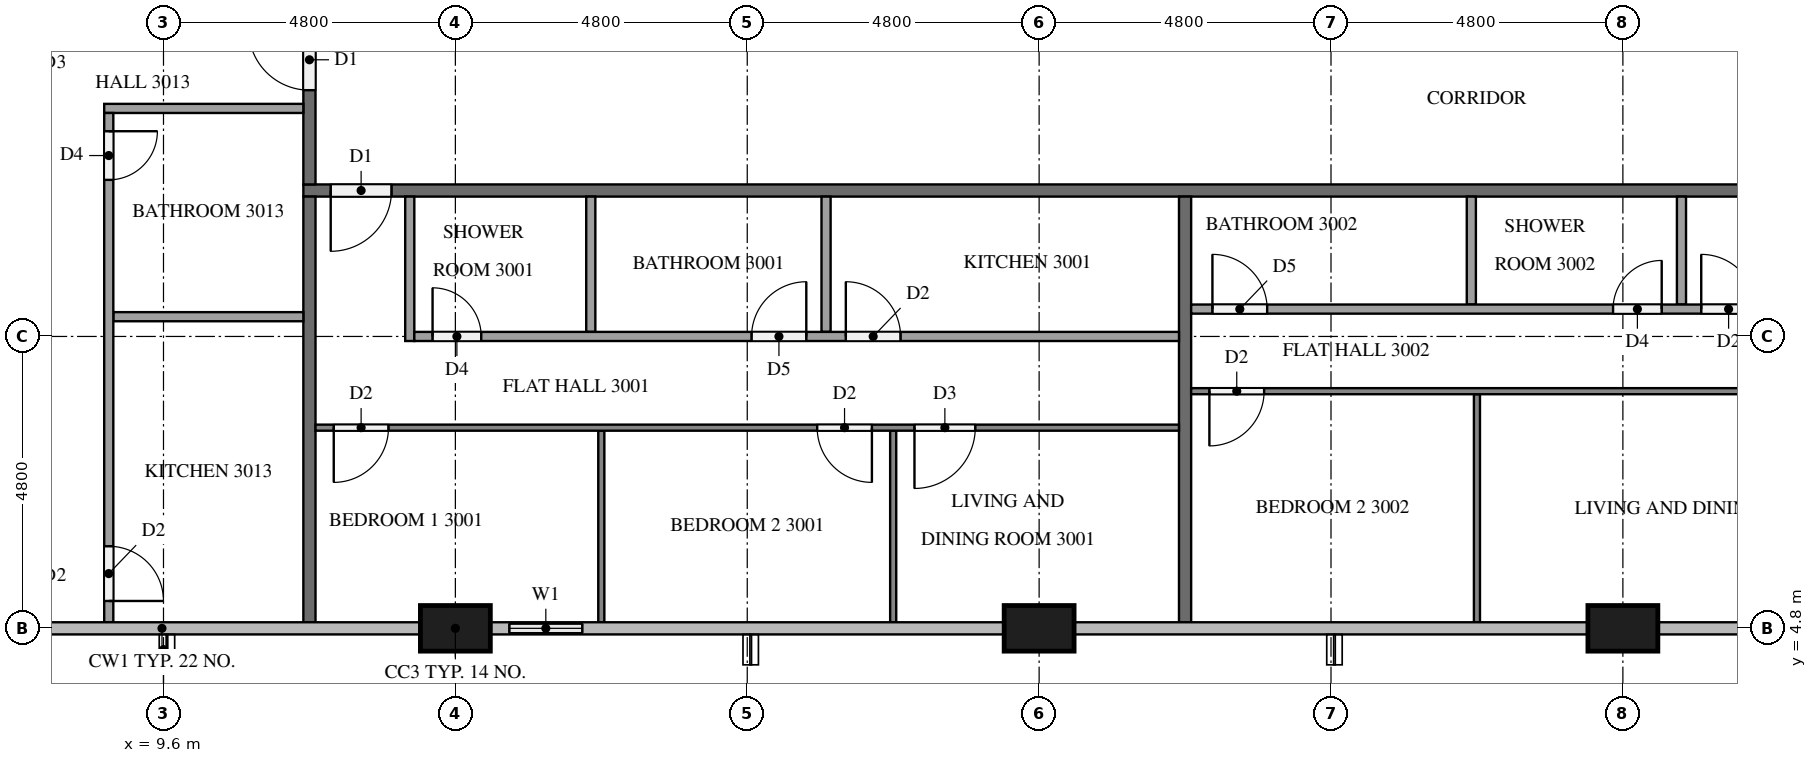
"""IFC4 building model, lengths in metres.
Left out: names, types, materials, properties, quantities, classifications, styles, units other than length and angle.
Written with IfcOpenShell. Run it as: python <this file> out.ifc"""

import sys

from ifc_helpers import new_model, si_unit, direction, frame, frame_2d, origin, origin_2d, place, context, subcontext, project, spatial, rectangle, extrude, element, fill, save


model = new_model("IFC4")
c1 = context("Model", 3, precision=1e-05, world=origin(), true_north=direction((0.0, 1.0)))
c2 = subcontext(c1, "Body", "Model", "MODEL_VIEW")
j1 = project(units=[si_unit("LENGTHUNIT", "METRE"), si_unit("PLANEANGLEUNIT", "RADIAN")], contexts=[c1])
p1 = place(None, origin())
s1 = spatial("IfcSite", under=j1, at=p1, CompositionType="ELEMENT")
p2 = place(p1, origin())
s2 = spatial("IfcBuilding", under=s1, at=p2, CompositionType="ELEMENT")
p3 = place(p2, frame((0.0, 0.0, 119.1)))
s3 = spatial("IfcBuildingStorey", under=s2, at=p3, CompositionType="ELEMENT", Elevation=119.1)
for number, where, z_axis, x_axis in (
    (1, (14.4, 4.8, 0.0), (0.0, 0.0, 1.0), (1.0, 0.0, 0.0)),
    (2, (24.0, 4.8, 0.0), (0.0, 0.0, 1.0), (1.0, 0.0, 0.0)),
    (3, (33.6, 4.8, 0.0), (0.0, 0.0, 1.0), (1.0, 0.0, 0.0)),
):
    element("IfcColumn", number, at=place(p3, frame(where, z_axis=z_axis, x_axis=x_axis)), inside=s3, PredefinedType="COLUMN", context=c2, shape_type="SweptSolid", body=[
        extrude(rectangle(XDim=1.15, YDim=0.75, at=origin_2d()), origin(), (0.0, 0.0, 1.0), 3.2),
    ])
p4 = place(p3, frame((14.975, 4.8, 0.0), z_axis=(0.0, 0.0, 1.0), x_axis=(1.0, 0.0, 0.0)))
e4 = element("IfcWall", 4, at=p4, inside=s3, PredefinedType="SOLIDWALL", context=c2, shape_type="SweptSolid", body=[
    extrude(rectangle(XDim=1.825, YDim=0.15, at=frame_2d((0.913, 0.0))), origin(), (0.0, 0.0, 1.0), 3.2),
])
p5 = place(p4, frame((0.312, 0.0, 0.9)))
e5 = element("IfcOpeningElement", 5, at=p5, cuts=e4, PredefinedType="OPENING", context=c2, shape_type="SweptSolid", body=[
    extrude(rectangle(XDim=1.2, YDim=1.4, at=frame_2d((0.6, 0.7))), frame((0.0, 0.085, 0.0), z_axis=(0.0, -1.0, 0.0), x_axis=(1.0, 0.0, 0.0)), (0.0, 0.0, 1.0), 0.17),
])
p6 = place(p3, frame((50.5, 12.0, 0.0), z_axis=(0.0, 0.0, 1.0), x_axis=(-1.0, 0.0, 0.0)))
e6 = element("IfcWall", 6, at=p6, inside=s3, PredefinedType="PARTITIONING", context=c2, shape_type="SweptSolid", body=[
    extrude(rectangle(XDim=38.6, YDim=0.2, at=frame_2d((19.3, 0.0))), origin(), (0.0, 0.0, 1.0), 3.2),
])
p7 = place(p6, frame((37.15, 0.0, 0.0)))
e7 = element("IfcOpeningElement", 7, at=p7, cuts=e6, PredefinedType="OPENING", context=c2, shape_type="SweptSolid", body=[
    extrude(rectangle(XDim=1.0, YDim=2.1, at=frame_2d((0.5, 1.05))), frame((0.0, 0.11, 0.0), z_axis=(0.0, -1.0, 0.0), x_axis=(1.0, 0.0, 0.0)), (0.0, 0.0, 1.0), 0.22),
])
p8 = place(p6, frame((7.65, 0.0, 0.0)))
e8 = element("IfcOpeningElement", 8, at=p8, cuts=e6, PredefinedType="OPENING", context=c2, shape_type="SweptSolid", body=[
    extrude(rectangle(XDim=1.0, YDim=2.1, at=frame_2d((0.5, 1.05))), frame((0.0, 0.11, 0.0), z_axis=(0.0, -1.0, 0.0), x_axis=(1.0, 0.0, 0.0)), (0.0, 0.0, 1.0), 0.22),
])
p9 = place(p6, frame((5.95, 0.0, 0.0)))
e9 = element("IfcOpeningElement", 9, at=p9, cuts=e6, PredefinedType="OPENING", context=c2, shape_type="SweptSolid", body=[
    extrude(rectangle(XDim=1.0, YDim=2.1, at=frame_2d((0.5, 1.05))), frame((0.0, 0.11, 0.0), z_axis=(0.0, -1.0, 0.0), x_axis=(1.0, 0.0, 0.0)), (0.0, 0.0, 1.0), 0.22),
])
p10 = place(p3, frame((12.0, 12.1, 0.0), z_axis=(0.0, 0.0, 1.0), x_axis=(0.0, 1.0, 0.0)))
e10 = element("IfcWall", 10, at=p10, inside=s3, PredefinedType="PARTITIONING", context=c2, shape_type="SweptSolid", body=[
    extrude(rectangle(XDim=2.8, YDim=0.2, at=frame_2d((1.4, 0.0))), origin(), (0.0, 0.0, 1.0), 3.2),
])
p11 = place(p10, frame((1.55, 0.0, 0.0)))
e11 = element("IfcOpeningElement", 11, at=p11, cuts=e10, PredefinedType="OPENING", context=c2, shape_type="SweptSolid", body=[
    extrude(rectangle(XDim=1.0, YDim=2.1, at=frame_2d((0.5, 1.05))), frame((0.0, 0.11, 0.0), z_axis=(0.0, -1.0, 0.0), x_axis=(1.0, 0.0, 0.0)), (0.0, 0.0, 1.0), 0.22),
])
for number, where, z_axis, x_axis in (
    (12, (26.4, 11.9, 0.0), (0.0, 0.0, 1.0), (0.0, -1.0, 0.0)),
    (13, (12.0, 4.9, 0.0), (0.0, 0.0, 1.0), (0.0, 1.0, 0.0)),
):
    element("IfcWall", number, at=place(p3, frame(where, z_axis=z_axis, x_axis=x_axis)), inside=s3, PredefinedType="PARTITIONING", context=c2, shape_type="SweptSolid", body=[
        extrude(rectangle(XDim=7.0, YDim=0.2, at=frame_2d((3.5, 0.0))), origin(), (0.0, 0.0, 1.0), 3.2),
    ])
for number, where, z_axis, x_axis in (
    (14, (16.8, 8.05, 0.0), (0.0, 0.0, 1.0), (0.0, -1.0, 0.0)),
    (15, (21.6, 8.05, 0.0), (0.0, 0.0, 1.0), (0.0, -1.0, 0.0)),
):
    element("IfcWall", number, at=place(p3, frame(where, z_axis=z_axis, x_axis=x_axis)), inside=s3, PredefinedType="PARTITIONING", context=c2, shape_type="SweptSolid", body=[
        extrude(rectangle(XDim=3.15, YDim=0.1, at=frame_2d((1.575, 0.0))), origin(), (0.0, 0.0, 1.0), 3.2),
    ])
p12 = place(p3, frame((26.3, 8.1, 0.0), z_axis=(0.0, 0.0, 1.0), x_axis=(-1.0, 0.0, 0.0)))
e16 = element("IfcWall", 16, at=p12, inside=s3, PredefinedType="PARTITIONING", context=c2, shape_type="SweptSolid", body=[
    extrude(rectangle(XDim=14.2, YDim=0.1, at=frame_2d((7.1, 0.0))), origin(), (0.0, 0.0, 1.0), 3.2),
])
p13 = place(p12, frame((13.0, 0.0, 0.0)))
e17 = element("IfcOpeningElement", 17, at=p13, cuts=e16, PredefinedType="OPENING", context=c2, shape_type="SweptSolid", body=[
    extrude(rectangle(XDim=0.9, YDim=2.1, at=frame_2d((0.45, 1.05))), frame((0.0, 0.06, 0.0), z_axis=(0.0, -1.0, 0.0), x_axis=(1.0, 0.0, 0.0)), (0.0, 0.0, 1.0), 0.12),
])
p14 = place(p12, frame((5.05, 0.0, 0.0)))
e18 = element("IfcOpeningElement", 18, at=p14, cuts=e16, PredefinedType="OPENING", context=c2, shape_type="SweptSolid", body=[
    extrude(rectangle(XDim=0.9, YDim=2.1, at=frame_2d((0.45, 1.05))), frame((0.0, 0.06, 0.0), z_axis=(0.0, -1.0, 0.0), x_axis=(1.0, 0.0, 0.0)), (0.0, 0.0, 1.0), 0.12),
])
p15 = place(p12, frame((3.35, 0.0, 0.0)))
e19 = element("IfcOpeningElement", 19, at=p15, cuts=e16, PredefinedType="OPENING", context=c2, shape_type="SweptSolid", body=[
    extrude(rectangle(XDim=1.0, YDim=2.1, at=frame_2d((0.5, 1.05))), frame((0.0, 0.06, 0.0), z_axis=(0.0, -1.0, 0.0), x_axis=(1.0, 0.0, 0.0)), (0.0, 0.0, 1.0), 0.12),
])
for number, where, z_axis, x_axis in (
    (20, (16.627, 11.9, 0.0), (0.0, 0.0, 1.0), (0.0, -1.0, 0.0)),
    (21, (20.496, 11.9, 0.0), (0.0, 0.0, 1.0), (0.0, -1.0, 0.0)),
):
    element("IfcWall", number, at=place(p3, frame(where, z_axis=z_axis, x_axis=x_axis)), inside=s3, PredefinedType="PARTITIONING", context=c2, shape_type="SweptSolid", body=[
        extrude(rectangle(XDim=2.225, YDim=0.15, at=frame_2d((1.112, 0.0))), origin(), (0.0, 0.0, 1.0), 3.2),
    ])
p16 = place(p3, frame((13.65, 11.9, 0.0), z_axis=(0.0, 0.0, 1.0), x_axis=(0.0, -1.0, 0.0)))
e22 = element("IfcWall", 22, at=p16, inside=s3, PredefinedType="PARTITIONING", context=c2, shape_type="SweptSolid", body=[
    extrude(rectangle(XDim=2.375, YDim=0.15, at=frame_2d((1.188, 0.0))), origin(), (0.0, 0.0, 1.0), 3.2),
])
p17 = place(p3, frame((13.725, 9.6, 0.0), z_axis=(0.0, 0.0, 1.0), x_axis=(1.0, 0.0, 0.0)))
e23 = element("IfcWall", 23, at=p17, inside=s3, PredefinedType="PARTITIONING", context=c2, shape_type="SweptSolid", body=[
    extrude(rectangle(XDim=12.575, YDim=0.15, at=frame_2d((6.288, 0.0))), origin(), (0.0, 0.0, 1.0), 3.2),
])
p18 = place(p17, frame((0.3, 0.0, 0.0)))
e24 = element("IfcOpeningElement", 24, at=p18, cuts=e23, PredefinedType="OPENING", context=c2, shape_type="SweptSolid", body=[
    extrude(rectangle(XDim=0.8, YDim=2.1, at=frame_2d((0.4, 1.05))), frame((0.0, 0.085, 0.0), z_axis=(0.0, -1.0, 0.0), x_axis=(1.0, 0.0, 0.0)), (0.0, 0.0, 1.0), 0.17),
])
p19 = place(p17, frame((5.546, 0.0, 0.0)))
e25 = element("IfcOpeningElement", 25, at=p19, cuts=e23, PredefinedType="OPENING", context=c2, shape_type="SweptSolid", body=[
    extrude(rectangle(XDim=0.9, YDim=2.1, at=frame_2d((0.45, 1.05))), frame((0.0, 0.085, 0.0), z_axis=(0.0, -1.0, 0.0), x_axis=(1.0, 0.0, 0.0)), (0.0, 0.0, 1.0), 0.17),
])
p20 = place(p17, frame((7.096, 0.0, 0.0)))
e26 = element("IfcOpeningElement", 26, at=p20, cuts=e23, PredefinedType="OPENING", context=c2, shape_type="SweptSolid", body=[
    extrude(rectangle(XDim=0.9, YDim=2.1, at=frame_2d((0.45, 1.05))), frame((0.0, 0.085, 0.0), z_axis=(0.0, -1.0, 0.0), x_axis=(1.0, 0.0, 0.0)), (0.0, 0.0, 1.0), 0.17),
])
p21 = place(p3, frame((31.2, 8.65, 0.0), z_axis=(0.0, 0.0, 1.0), x_axis=(0.0, -1.0, 0.0)))
e27 = element("IfcWall", 27, at=p21, inside=s3, PredefinedType="PARTITIONING", context=c2, shape_type="SweptSolid", body=[
    extrude(rectangle(XDim=3.75, YDim=0.1, at=frame_2d((1.875, 0.0))), origin(), (0.0, 0.0, 1.0), 3.2),
])
p22 = place(p3, frame((43.1, 8.7, 0.0), z_axis=(0.0, 0.0, 1.0), x_axis=(-1.0, 0.0, 0.0)))
e28 = element("IfcWall", 28, at=p22, inside=s3, PredefinedType="PARTITIONING", context=c2, shape_type="SweptSolid", body=[
    extrude(rectangle(XDim=16.6, YDim=0.1, at=frame_2d((8.3, 0.0))), origin(), (0.0, 0.0, 1.0), 3.2),
])
p23 = place(p22, frame((3.45, 0.0, 0.0)))
e29 = element("IfcOpeningElement", 29, at=p23, cuts=e28, PredefinedType="OPENING", context=c2, shape_type="SweptSolid", body=[
    extrude(rectangle(XDim=0.9, YDim=2.1, at=frame_2d((0.45, 1.05))), frame((0.0, 0.06, 0.0), z_axis=(0.0, -1.0, 0.0), x_axis=(1.0, 0.0, 0.0)), (0.0, 0.0, 1.0), 0.12),
])
p24 = place(p22, frame((5.05, 0.0, 0.0)))
e30 = element("IfcOpeningElement", 30, at=p24, cuts=e28, PredefinedType="OPENING", context=c2, shape_type="SweptSolid", body=[
    extrude(rectangle(XDim=1.0, YDim=2.1, at=frame_2d((0.5, 1.05))), frame((0.0, 0.06, 0.0), z_axis=(0.0, -1.0, 0.0), x_axis=(1.0, 0.0, 0.0)), (0.0, 0.0, 1.0), 0.12),
])
p25 = place(p22, frame((15.4, 0.0, 0.0)))
e31 = element("IfcOpeningElement", 31, at=p25, cuts=e28, PredefinedType="OPENING", context=c2, shape_type="SweptSolid", body=[
    extrude(rectangle(XDim=0.9, YDim=2.1, at=frame_2d((0.45, 1.05))), frame((0.0, 0.06, 0.0), z_axis=(0.0, -1.0, 0.0), x_axis=(1.0, 0.0, 0.0)), (0.0, 0.0, 1.0), 0.12),
])
for number, where, z_axis, x_axis in (
    (32, (34.563, 11.9, 0.0), (0.0, 0.0, 1.0), (0.0, -1.0, 0.0)),
    (33, (31.108, 11.9, 0.0), (0.0, 0.0, 1.0), (0.0, -1.0, 0.0)),
):
    element("IfcWall", number, at=place(p3, frame(where, z_axis=z_axis, x_axis=x_axis)), inside=s3, PredefinedType="PARTITIONING", context=c2, shape_type="SweptSolid", body=[
        extrude(rectangle(XDim=1.775, YDim=0.15, at=frame_2d((0.887, 0.0))), origin(), (0.0, 0.0, 1.0), 3.2),
    ])
p26 = place(p3, frame((26.5, 10.05, 0.0), z_axis=(0.0, 0.0, 1.0), x_axis=(1.0, 0.0, 0.0)))
e34 = element("IfcWall", 34, at=p26, inside=s3, PredefinedType="PARTITIONING", context=c2, shape_type="SweptSolid", body=[
    extrude(rectangle(XDim=14.975, YDim=0.15, at=frame_2d((7.488, 0.0))), origin(), (0.0, 0.0, 1.0), 3.2),
])
p27 = place(p26, frame((8.388, 0.0, 0.0)))
e35 = element("IfcOpeningElement", 35, at=p27, cuts=e34, PredefinedType="OPENING", context=c2, shape_type="SweptSolid", body=[
    extrude(rectangle(XDim=0.9, YDim=2.1, at=frame_2d((0.45, 1.05))), frame((0.0, 0.085, 0.0), z_axis=(0.0, -1.0, 0.0), x_axis=(1.0, 0.0, 0.0)), (0.0, 0.0, 1.0), 0.17),
])
p28 = place(p26, frame((6.938, 0.0, 0.0)))
e36 = element("IfcOpeningElement", 36, at=p28, cuts=e34, PredefinedType="OPENING", context=c2, shape_type="SweptSolid", body=[
    extrude(rectangle(XDim=0.8, YDim=2.1, at=frame_2d((0.4, 1.05))), frame((0.0, 0.085, 0.0), z_axis=(0.0, -1.0, 0.0), x_axis=(1.0, 0.0, 0.0)), (0.0, 0.0, 1.0), 0.17),
])
p29 = place(p26, frame((0.35, 0.0, 0.0)))
e37 = element("IfcOpeningElement", 37, at=p29, cuts=e34, PredefinedType="OPENING", context=c2, shape_type="SweptSolid", body=[
    extrude(rectangle(XDim=0.9, YDim=2.1, at=frame_2d((0.45, 1.05))), frame((0.0, 0.085, 0.0), z_axis=(0.0, -1.0, 0.0), x_axis=(1.0, 0.0, 0.0)), (0.0, 0.0, 1.0), 0.17),
])
p30 = place(p3, frame((11.9, 9.925, 0.0), z_axis=(0.0, 0.0, 1.0), x_axis=(-1.0, 0.0, 0.0)))
e38 = element("IfcWall", 38, at=p30, inside=s3, PredefinedType="PARTITIONING", context=c2, shape_type="SweptSolid", body=[
    extrude(rectangle(XDim=3.125, YDim=0.15, at=frame_2d((1.562, 0.0))), origin(), (0.0, 0.0, 1.0), 3.2),
])
p31 = place(p3, frame((11.9, 13.35, 0.0), z_axis=(0.0, 0.0, 1.0), x_axis=(-1.0, 0.0, 0.0)))
e39 = element("IfcWall", 39, at=p31, inside=s3, PredefinedType="PARTITIONING", context=c2, shape_type="SweptSolid", body=[
    extrude(rectangle(XDim=3.275, YDim=0.15, at=frame_2d((1.637, 0.0))), origin(), (0.0, 0.0, 1.0), 3.2),
])
p32 = place(p3, frame((8.7, 13.275, 0.0), z_axis=(0.0, 0.0, 1.0), x_axis=(0.0, -1.0, 0.0)))
e40 = element("IfcWall", 40, at=p32, inside=s3, PredefinedType="PARTITIONING", context=c2, shape_type="SweptSolid", body=[
    extrude(rectangle(XDim=8.375, YDim=0.15, at=frame_2d((4.188, 0.0))), origin(), (0.0, 0.0, 1.0), 3.2),
])
p33 = place(p32, frame((0.3, 0.0, 0.0)))
e41 = element("IfcOpeningElement", 41, at=p33, cuts=e40, PredefinedType="OPENING", context=c2, shape_type="SweptSolid", body=[
    extrude(rectangle(XDim=0.8, YDim=2.1, at=frame_2d((0.4, 1.05))), frame((0.0, 0.085, 0.0), z_axis=(0.0, -1.0, 0.0), x_axis=(1.0, 0.0, 0.0)), (0.0, 0.0, 1.0), 0.17),
])
p34 = place(p32, frame((7.125, 0.0, 0.0)))
e42 = element("IfcOpeningElement", 42, at=p34, cuts=e40, PredefinedType="OPENING", context=c2, shape_type="SweptSolid", body=[
    extrude(rectangle(XDim=0.9, YDim=2.1, at=frame_2d((0.45, 1.05))), frame((0.0, 0.085, 0.0), z_axis=(0.0, -1.0, 0.0), x_axis=(1.0, 0.0, 0.0)), (0.0, 0.0, 1.0), 0.17),
])
p35 = place(p5, origin())
e43 = element("IfcWindow", 43, at=p35, inside=s3, PartitioningType="SINGLE_PANEL", PredefinedType="WINDOW", context=c2, shape_type="SweptSolid", body=[
    extrude(rectangle(XDim=1.2, YDim=1.4, at=frame_2d((0.6, 0.7))), frame((0.0, 0.03, 0.0), z_axis=(0.0, -1.0, 0.0), x_axis=(1.0, 0.0, 0.0)), (0.0, 0.0, 1.0), 0.06),
])
fill(e5, e43)
p36 = place(p7, origin())
e44 = element("IfcDoor", 44, at=p36, inside=s3, OperationType="SINGLE_SWING_RIGHT", PredefinedType="DOOR", context=c2, shape_type="SweptSolid", body=[
    extrude(rectangle(XDim=1.0, YDim=2.1, at=frame_2d((0.5, 1.05))), frame((0.0, 0.025, 0.0), z_axis=(0.0, -1.0, 0.0), x_axis=(1.0, 0.0, 0.0)), (0.0, 0.0, 1.0), 0.05),
])
fill(e7, e44)
p37 = place(p11, origin())
e45 = element("IfcDoor", 45, at=p37, inside=s3, OperationType="SINGLE_SWING_RIGHT", PredefinedType="DOOR", context=c2, shape_type="SweptSolid", body=[
    extrude(rectangle(XDim=1.0, YDim=2.1, at=frame_2d((0.5, 1.05))), frame((0.0, 0.025, 0.0), z_axis=(0.0, -1.0, 0.0), x_axis=(1.0, 0.0, 0.0)), (0.0, 0.0, 1.0), 0.05),
])
fill(e11, e45)
p38 = place(p13, origin())
e46 = element("IfcDoor", 46, at=p38, inside=s3, OperationType="SINGLE_SWING_RIGHT", PredefinedType="DOOR", context=c2, shape_type="SweptSolid", body=[
    extrude(rectangle(XDim=0.9, YDim=2.1, at=frame_2d((0.45, 1.05))), frame((0.0, 0.025, 0.0), z_axis=(0.0, -1.0, 0.0), x_axis=(1.0, 0.0, 0.0)), (0.0, 0.0, 1.0), 0.05),
])
fill(e17, e46)
p39 = place(p14, origin())
e47 = element("IfcDoor", 47, at=p39, inside=s3, OperationType="SINGLE_SWING_LEFT", PredefinedType="DOOR", context=c2, shape_type="SweptSolid", body=[
    extrude(rectangle(XDim=0.9, YDim=2.1, at=frame_2d((0.45, 1.05))), frame((0.0, 0.025, 0.0), z_axis=(0.0, -1.0, 0.0), x_axis=(1.0, 0.0, 0.0)), (0.0, 0.0, 1.0), 0.05),
])
fill(e18, e47)
p40 = place(p15, origin())
e48 = element("IfcDoor", 48, at=p40, inside=s3, OperationType="SINGLE_SWING_RIGHT", PredefinedType="DOOR", context=c2, shape_type="SweptSolid", body=[
    extrude(rectangle(XDim=1.0, YDim=2.1, at=frame_2d((0.5, 1.05))), frame((0.0, 0.025, 0.0), z_axis=(0.0, -1.0, 0.0), x_axis=(1.0, 0.0, 0.0)), (0.0, 0.0, 1.0), 0.05),
])
fill(e19, e48)
p41 = place(p18, origin())
e49 = element("IfcDoor", 49, at=p41, inside=s3, OperationType="SINGLE_SWING_LEFT", PredefinedType="DOOR", context=c2, shape_type="SweptSolid", body=[
    extrude(rectangle(XDim=0.8, YDim=2.1, at=frame_2d((0.4, 1.05))), frame((0.0, 0.025, 0.0), z_axis=(0.0, -1.0, 0.0), x_axis=(1.0, 0.0, 0.0)), (0.0, 0.0, 1.0), 0.05),
])
fill(e24, e49)
p42 = place(p19, origin())
e50 = element("IfcDoor", 50, at=p42, inside=s3, OperationType="SINGLE_SWING_RIGHT", PredefinedType="DOOR", context=c2, shape_type="SweptSolid", body=[
    extrude(rectangle(XDim=0.9, YDim=2.1, at=frame_2d((0.45, 1.05))), frame((0.0, 0.025, 0.0), z_axis=(0.0, -1.0, 0.0), x_axis=(1.0, 0.0, 0.0)), (0.0, 0.0, 1.0), 0.05),
])
fill(e25, e50)
p43 = place(p20, origin())
e51 = element("IfcDoor", 51, at=p43, inside=s3, OperationType="SINGLE_SWING_LEFT", PredefinedType="DOOR", context=c2, shape_type="SweptSolid", body=[
    extrude(rectangle(XDim=0.9, YDim=2.1, at=frame_2d((0.45, 1.05))), frame((0.0, 0.025, 0.0), z_axis=(0.0, -1.0, 0.0), x_axis=(1.0, 0.0, 0.0)), (0.0, 0.0, 1.0), 0.05),
])
fill(e26, e51)
p44 = place(p25, origin())
e52 = element("IfcDoor", 52, at=p44, inside=s3, OperationType="SINGLE_SWING_RIGHT", PredefinedType="DOOR", context=c2, shape_type="SweptSolid", body=[
    extrude(rectangle(XDim=0.9, YDim=2.1, at=frame_2d((0.45, 1.05))), frame((0.0, 0.025, 0.0), z_axis=(0.0, -1.0, 0.0), x_axis=(1.0, 0.0, 0.0)), (0.0, 0.0, 1.0), 0.05),
])
fill(e31, e52)
p45 = place(p27, origin())
e53 = element("IfcDoor", 53, at=p45, inside=s3, OperationType="SINGLE_SWING_LEFT", PredefinedType="DOOR", context=c2, shape_type="SweptSolid", body=[
    extrude(rectangle(XDim=0.9, YDim=2.1, at=frame_2d((0.45, 1.05))), frame((0.0, 0.025, 0.0), z_axis=(0.0, -1.0, 0.0), x_axis=(1.0, 0.0, 0.0)), (0.0, 0.0, 1.0), 0.05),
])
fill(e35, e53)
p46 = place(p28, origin())
e54 = element("IfcDoor", 54, at=p46, inside=s3, OperationType="SINGLE_SWING_RIGHT", PredefinedType="DOOR", context=c2, shape_type="SweptSolid", body=[
    extrude(rectangle(XDim=0.8, YDim=2.1, at=frame_2d((0.4, 1.05))), frame((0.0, 0.025, 0.0), z_axis=(0.0, -1.0, 0.0), x_axis=(1.0, 0.0, 0.0)), (0.0, 0.0, 1.0), 0.05),
])
fill(e36, e54)
p47 = place(p29, origin())
e55 = element("IfcDoor", 55, at=p47, inside=s3, OperationType="SINGLE_SWING_LEFT", PredefinedType="DOOR", context=c2, shape_type="SweptSolid", body=[
    extrude(rectangle(XDim=0.9, YDim=2.1, at=frame_2d((0.45, 1.05))), frame((0.0, 0.025, 0.0), z_axis=(0.0, -1.0, 0.0), x_axis=(1.0, 0.0, 0.0)), (0.0, 0.0, 1.0), 0.05),
])
fill(e37, e55)
p48 = place(p33, origin())
e56 = element("IfcDoor", 56, at=p48, inside=s3, OperationType="SINGLE_SWING_LEFT", PredefinedType="DOOR", context=c2, shape_type="SweptSolid", body=[
    extrude(rectangle(XDim=0.8, YDim=2.1, at=frame_2d((0.4, 1.05))), frame((0.0, 0.025, 0.0), z_axis=(0.0, -1.0, 0.0), x_axis=(1.0, 0.0, 0.0)), (0.0, 0.0, 1.0), 0.05),
])
fill(e41, e56)
p49 = place(p34, origin())
e57 = element("IfcDoor", 57, at=p49, inside=s3, OperationType="SINGLE_SWING_RIGHT", PredefinedType="DOOR", context=c2, shape_type="SweptSolid", body=[
    extrude(rectangle(XDim=0.9, YDim=2.1, at=frame_2d((0.45, 1.05))), frame((0.0, 0.025, 0.0), z_axis=(0.0, -1.0, 0.0), x_axis=(1.0, 0.0, 0.0)), (0.0, 0.0, 1.0), 0.05),
])
fill(e42, e57)
save(model, sys.argv[1])
